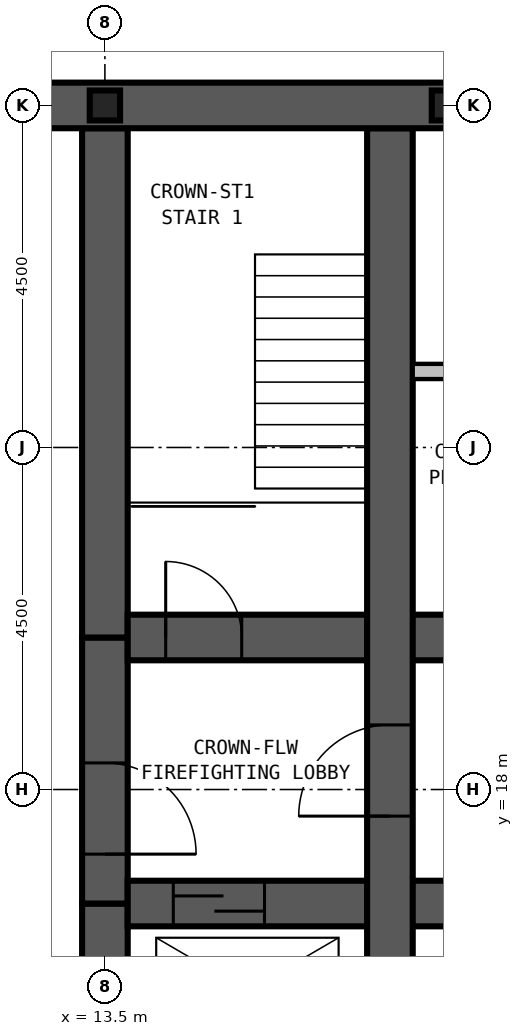
"""IFC4 building model, lengths in metres.
Left out: names, types, materials, properties, quantities, classifications, styles, units other than length and angle.
Written with IfcOpenShell. Run it as: python <this file> out.ifc"""

import sys

from ifc_helpers import new_model, si_unit, direction, frame, frame_2d, origin, origin_2d, place, context, subcontext, project, spatial, polyline, rectangle, i_section, outline, extrude, clip, halfspace, element, fill, save


model = new_model("IFC4")
c1 = context("Model", 3, precision=1e-05, world=origin(), true_north=direction((0.0, 1.0)))
c2 = subcontext(c1, "Body", "Model", "MODEL_VIEW")
j1 = project(units=[si_unit("LENGTHUNIT", "METRE"), si_unit("PLANEANGLEUNIT", "RADIAN")], contexts=[c1])
p1 = place(None, origin())
s1 = spatial("IfcSite", under=j1, at=p1, CompositionType="ELEMENT")
p2 = place(p1, origin())
s2 = spatial("IfcBuilding", under=s1, at=p2, CompositionType="ELEMENT")
p3 = place(p2, frame((0.0, 0.0, 289.7)))
s3 = spatial("IfcBuildingStorey", under=s2, at=p3, CompositionType="ELEMENT", Elevation=289.7)
p4 = place(p3, frame((36.3, 27.0, 0.0), z_axis=(0.0, 0.0, 1.0), x_axis=(-1.0, 0.0, 0.0)))
e1 = element("IfcWall", 1, at=p4, inside=s3, PredefinedType="SHEAR", context=c2, shape_type="SweptSolid", body=[
    extrude(rectangle(XDim=23.6, YDim=0.6, at=frame_2d((11.8, 0.0))), origin(), (0.0, 0.0, 1.0), 4.0),
])
p5 = place(p4, frame((17.05, 0.0, 0.0)))
e2 = element("IfcOpeningElement", 2, at=p5, cuts=e1, PredefinedType="OPENING", context=c2, shape_type="SweptSolid", body=[
    extrude(rectangle(XDim=1.0, YDim=2.1, at=frame_2d((0.5, 1.05))), frame((0.0, 0.31, 0.0), z_axis=(0.0, -1.0, 0.0), x_axis=(1.0, 0.0, 0.0)), (0.0, 0.0, 1.0), 0.62),
])
p6 = place(p4, frame((12.05, 0.0, 0.0)))
e3 = element("IfcOpeningElement", 3, at=p6, cuts=e1, PredefinedType="OPENING", context=c2, shape_type="SweptSolid", body=[
    extrude(rectangle(XDim=1.0, YDim=2.1, at=frame_2d((0.5, 1.05))), frame((0.0, 0.31, 0.0), z_axis=(0.0, -1.0, 0.0), x_axis=(1.0, 0.0, 0.0)), (0.0, 0.0, 1.0), 0.62),
])
p7 = place(p4, frame((7.05, 0.0, 0.0)))
e4 = element("IfcOpeningElement", 4, at=p7, cuts=e1, PredefinedType="OPENING", context=c2, shape_type="SweptSolid", body=[
    extrude(rectangle(XDim=1.0, YDim=2.1, at=frame_2d((0.5, 1.05))), frame((0.0, 0.31, 0.0), z_axis=(0.0, -1.0, 0.0), x_axis=(1.0, 0.0, 0.0)), (0.0, 0.0, 1.0), 0.62),
])
p8 = place(p3, frame((17.25, 13.8, 0.0), z_axis=(0.0, 0.0, 1.0), x_axis=(0.0, 1.0, 0.0)))
e5 = element("IfcWall", 5, at=p8, inside=s3, PredefinedType="SHEAR", context=c2, shape_type="SweptSolid", body=[
    extrude(rectangle(XDim=12.9, YDim=0.6, at=frame_2d((6.45, 0.0))), origin(), (0.0, 0.0, 1.0), 4.0),
])
p9 = place(p8, frame((3.85, 0.0, 0.0)))
e6 = element("IfcOpeningElement", 6, at=p9, cuts=e5, PredefinedType="OPENING", context=c2, shape_type="SweptSolid", body=[
    extrude(rectangle(XDim=1.2, YDim=2.1, at=frame_2d((0.6, 1.05))), frame((0.0, 0.31, 0.0), z_axis=(0.0, -1.0, 0.0), x_axis=(1.0, 0.0, 0.0)), (0.0, 0.0, 1.0), 0.62),
])
p10 = place(p3, frame((13.8, 16.5, 0.0), z_axis=(0.0, 0.0, 1.0), x_axis=(1.0, 0.0, 0.0)))
e7 = element("IfcWall", 7, at=p10, inside=s3, PredefinedType="SHEAR", context=c2, shape_type="SweptSolid", body=[
    extrude(rectangle(XDim=21.9, YDim=0.6, at=frame_2d((10.95, 0.0))), origin(), (0.0, 0.0, 1.0), 4.0),
])
p11 = place(p10, frame((5.75, 0.0, 0.0), z_axis=(0.0, 0.0, 1.0), x_axis=(-1.0, 0.0, 0.0)))
e8 = element("IfcOpeningElement", 8, at=p11, cuts=e7, PredefinedType="OPENING", context=c2, shape_type="SweptSolid", body=[
    extrude(rectangle(XDim=1.0, YDim=2.1, at=frame_2d((0.5, 1.05))), frame((0.0, 0.31, 0.0), z_axis=(0.0, -1.0, 0.0), x_axis=(1.0, 0.0, 0.0)), (0.0, 0.0, 1.0), 0.62),
])
p12 = place(p10, frame((10.2, 0.0, 0.0), z_axis=(0.0, 0.0, 1.0), x_axis=(-1.0, 0.0, 0.0)))
e9 = element("IfcOpeningElement", 9, at=p12, cuts=e7, PredefinedType="OPENING", context=c2, shape_type="SweptSolid", body=[
    extrude(rectangle(XDim=1.0, YDim=2.1, at=frame_2d((0.5, 1.05))), frame((0.0, 0.31, 0.0), z_axis=(0.0, -1.0, 0.0), x_axis=(1.0, 0.0, 0.0)), (0.0, 0.0, 1.0), 0.62),
])
p13 = place(p10, frame((12.7, 0.0, 0.0), z_axis=(0.0, 0.0, 1.0), x_axis=(-1.0, 0.0, 0.0)))
e10 = element("IfcOpeningElement", 10, at=p13, cuts=e7, PredefinedType="OPENING", context=c2, shape_type="SweptSolid", body=[
    extrude(rectangle(XDim=1.0, YDim=2.1, at=frame_2d((0.5, 1.05))), frame((0.0, 0.31, 0.0), z_axis=(0.0, -1.0, 0.0), x_axis=(1.0, 0.0, 0.0)), (0.0, 0.0, 1.0), 0.62),
])
p14 = place(p10, frame((17.15, 0.0, 0.0), z_axis=(0.0, 0.0, 1.0), x_axis=(-1.0, 0.0, 0.0)))
e11 = element("IfcOpeningElement", 11, at=p14, cuts=e7, PredefinedType="OPENING", context=c2, shape_type="SweptSolid", body=[
    extrude(rectangle(XDim=1.0, YDim=2.1, at=frame_2d((0.5, 1.05))), frame((0.0, 0.31, 0.0), z_axis=(0.0, -1.0, 0.0), x_axis=(1.0, 0.0, 0.0)), (0.0, 0.0, 1.0), 0.62),
])
p15 = place(p10, frame((0.6, 0.0, 0.0)))
e12 = element("IfcOpeningElement", 12, at=p15, cuts=e7, PredefinedType="OPENING", context=c2, shape_type="SweptSolid", body=[
    extrude(rectangle(XDim=1.2, YDim=2.1, at=frame_2d((0.6, 1.05))), frame((0.0, 0.31, 0.0), z_axis=(0.0, -1.0, 0.0), x_axis=(1.0, 0.0, 0.0)), (0.0, 0.0, 1.0), 0.62),
])
p16 = place(p10, frame((19.6, 0.0, 0.0)))
e13 = element("IfcOpeningElement", 13, at=p16, cuts=e7, PredefinedType="OPENING", context=c2, shape_type="SweptSolid", body=[
    extrude(rectangle(XDim=1.2, YDim=2.1, at=frame_2d((0.6, 1.05))), frame((0.0, 0.31, 0.0), z_axis=(0.0, -1.0, 0.0), x_axis=(1.0, 0.0, 0.0)), (0.0, 0.0, 1.0), 0.62),
])
p17 = place(p3, frame((13.8, 20.0, 0.0), z_axis=(0.0, 0.0, 1.0), x_axis=(1.0, 0.0, 0.0)))
e14 = element("IfcWall", 14, at=p17, inside=s3, PredefinedType="SHEAR", context=c2, shape_type="SweptSolid", body=[
    extrude(rectangle(XDim=21.9, YDim=0.6, at=frame_2d((10.95, 0.0))), origin(), (0.0, 0.0, 1.0), 4.0),
])
p18 = place(p17, frame((0.5, 0.0, 0.0)))
e15 = element("IfcOpeningElement", 15, at=p18, cuts=e14, PredefinedType="OPENING", context=c2, shape_type="SweptSolid", body=[
    extrude(rectangle(XDim=1.0, YDim=2.1, at=frame_2d((0.5, 1.05))), frame((0.0, 0.31, 0.0), z_axis=(0.0, -1.0, 0.0), x_axis=(1.0, 0.0, 0.0)), (0.0, 0.0, 1.0), 0.62),
])
p19 = place(p17, frame((20.5, 0.0, 0.0)))
e16 = element("IfcOpeningElement", 16, at=p19, cuts=e14, PredefinedType="OPENING", context=c2, shape_type="SweptSolid", body=[
    extrude(rectangle(XDim=1.0, YDim=2.1, at=frame_2d((0.5, 1.05))), frame((0.0, 0.31, 0.0), z_axis=(0.0, -1.0, 0.0), x_axis=(1.0, 0.0, 0.0)), (0.0, 0.0, 1.0), 0.62),
])
p20 = place(p17, frame((4.75, 0.0, 0.0)))
e17 = element("IfcOpeningElement", 17, at=p20, cuts=e14, PredefinedType="OPENING", context=c2, shape_type="SweptSolid", body=[
    extrude(rectangle(XDim=1.0, YDim=2.1, at=frame_2d((0.5, 1.05))), frame((0.0, 0.31, 0.0), z_axis=(0.0, -1.0, 0.0), x_axis=(1.0, 0.0, 0.0)), (0.0, 0.0, 1.0), 0.62),
])
p21 = place(p17, frame((6.7, 0.0, 0.0)))
e18 = element("IfcOpeningElement", 18, at=p21, cuts=e14, PredefinedType="OPENING", context=c2, shape_type="SweptSolid", body=[
    extrude(rectangle(XDim=1.0, YDim=2.1, at=frame_2d((0.5, 1.05))), frame((0.0, 0.31, 0.0), z_axis=(0.0, -1.0, 0.0), x_axis=(1.0, 0.0, 0.0)), (0.0, 0.0, 1.0), 0.62),
])
p22 = place(p3, frame((13.5, 26.7, 0.0), z_axis=(0.0, 0.0, 1.0), x_axis=(0.0, -1.0, 0.0)))
e19 = element("IfcWall", 19, at=p22, inside=s3, PredefinedType="SHEAR", context=c2, shape_type="SweptSolid", body=[
    extrude(rectangle(XDim=6.7, YDim=0.6, at=frame_2d((3.35, 0.0))), origin(), (0.0, 0.0, 1.0), 4.0),
])
p23 = place(p3, frame((13.5, 20.0, 0.0), z_axis=(0.0, 0.0, 1.0), x_axis=(0.0, -1.0, 0.0)))
e20 = element("IfcWall", 20, at=p23, inside=s3, PredefinedType="SHEAR", context=c2, shape_type="SweptSolid", body=[
    extrude(rectangle(XDim=3.5, YDim=0.6, at=frame_2d((1.75, 0.0))), origin(), (0.0, 0.0, 1.0), 4.0),
])
p24 = place(p23, frame((1.65, 0.0, 0.0)))
e21 = element("IfcOpeningElement", 21, at=p24, cuts=e20, PredefinedType="OPENING", context=c2, shape_type="SweptSolid", body=[
    extrude(rectangle(XDim=1.2, YDim=2.1, at=frame_2d((0.6, 1.05))), frame((0.0, 0.31, 0.0), z_axis=(0.0, -1.0, 0.0), x_axis=(1.0, 0.0, 0.0)), (0.0, 0.0, 1.0), 0.62),
])
p25 = place(p3, frame((13.5, 16.5, 0.0), z_axis=(0.0, 0.0, 1.0), x_axis=(0.0, -1.0, 0.0)))
e22 = element("IfcWall", 22, at=p25, inside=s3, PredefinedType="SHEAR", context=c2, shape_type="SweptSolid", body=[
    extrude(rectangle(XDim=2.7, YDim=0.6, at=frame_2d((1.35, 0.0))), origin(), (0.0, 0.0, 1.0), 4.0),
])
p26 = place(p3, frame((13.5, 27.0, 4.0), z_axis=(0.0, 0.0, 1.0), x_axis=(1.0, 0.0, 0.0)))
e23 = element("IfcColumn", 23, at=p26, inside=s3, PredefinedType="COLUMN", context=c2, shape_type="SweptSolid", body=[
    extrude(i_section(OverallWidth=0.399, OverallDepth=0.394, WebThickness=0.023, FlangeThickness=0.037, FilletRadius=0.015, at=origin_2d()), origin(), (0.0, 0.0, 1.0), 4.29),
])
p27 = place(p3, frame((18.0, 27.0, 4.0), z_axis=(0.0, 0.0, 1.0), x_axis=(1.0, 0.0, 0.0)))
e24 = element("IfcColumn", 24, at=p27, inside=s3, PredefinedType="COLUMN", context=c2, shape_type="SweptSolid", body=[
    extrude(i_section(OverallWidth=0.399, OverallDepth=0.394, WebThickness=0.023, FlangeThickness=0.037, FilletRadius=0.015, at=origin_2d()), origin(), (0.0, 0.0, 1.0), 5.73),
])
p28 = place(p3, frame((13.114, 41.099, -0.3), z_axis=(0.0, 0.0, 1.0), x_axis=(-0.110429082637, -0.993884006164, 0.0)))
e25 = element("IfcWall", 25, at=p28, inside=s3, PredefinedType="STANDARD", context=c2, shape_type="Clipping", body=[
    clip(extrude(outline(polyline([(0.0, 0.0), (32.899, 0.0), (32.899, 3.117), (0.0, 13.435), (0.0, 0.0)])), frame((0.0, 0.15, 0.0), z_axis=(0.0, -1.0, 0.0), x_axis=(1.0, 0.0, 0.0)), (0.0, 0.0, 1.0), 0.3), halfspace(frame((0.0, 0.0, 13.435), z_axis=(0.288617563537, -0.264228140999, 0.920262675285), x_axis=(0.954173815871, 0.0, -0.299252951709)), False)),
])
p29 = place(p28, frame((1.617, 0.0, 0.8)))
e26 = element("IfcOpeningElement", 26, at=p29, cuts=e25, PredefinedType="OPENING", context=c2, shape_type="SweptSolid", body=[
    extrude(rectangle(XDim=2.4, YDim=1.8, at=frame_2d((1.2, 0.9))), frame((0.0, 0.16, 0.0), z_axis=(0.0, -1.0, 0.0), x_axis=(1.0, 0.0, 0.0)), (0.0, 0.0, 1.0), 0.32),
])
p30 = place(p28, frame((6.145, 0.0, 0.8)))
e27 = element("IfcOpeningElement", 27, at=p30, cuts=e25, PredefinedType="OPENING", context=c2, shape_type="SweptSolid", body=[
    extrude(rectangle(XDim=2.4, YDim=1.8, at=frame_2d((1.2, 0.9))), frame((0.0, 0.16, 0.0), z_axis=(0.0, -1.0, 0.0), x_axis=(1.0, 0.0, 0.0)), (0.0, 0.0, 1.0), 0.32),
])
p31 = place(p28, frame((10.672, 0.0, 0.8)))
e28 = element("IfcOpeningElement", 28, at=p31, cuts=e25, PredefinedType="OPENING", context=c2, shape_type="SweptSolid", body=[
    extrude(rectangle(XDim=2.4, YDim=1.8, at=frame_2d((1.2, 0.9))), frame((0.0, 0.16, 0.0), z_axis=(0.0, -1.0, 0.0), x_axis=(1.0, 0.0, 0.0)), (0.0, 0.0, 1.0), 0.32),
])
p32 = place(p28, frame((15.2, 0.0, 0.8)))
e29 = element("IfcOpeningElement", 29, at=p32, cuts=e25, PredefinedType="OPENING", context=c2, shape_type="SweptSolid", body=[
    extrude(rectangle(XDim=2.4, YDim=1.8, at=frame_2d((1.2, 0.9))), frame((0.0, 0.16, 0.0), z_axis=(0.0, -1.0, 0.0), x_axis=(1.0, 0.0, 0.0)), (0.0, 0.0, 1.0), 0.32),
])
p33 = place(p28, frame((19.728, 0.0, 0.8)))
e30 = element("IfcOpeningElement", 30, at=p33, cuts=e25, PredefinedType="OPENING", context=c2, shape_type="SweptSolid", body=[
    extrude(rectangle(XDim=2.4, YDim=1.8, at=frame_2d((1.2, 0.9))), frame((0.0, 0.16, 0.0), z_axis=(0.0, -1.0, 0.0), x_axis=(1.0, 0.0, 0.0)), (0.0, 0.0, 1.0), 0.32),
])
p34 = place(p28, frame((24.255, 0.0, 0.8)))
e31 = element("IfcOpeningElement", 31, at=p34, cuts=e25, PredefinedType="OPENING", context=c2, shape_type="SweptSolid", body=[
    extrude(rectangle(XDim=2.4, YDim=1.8, at=frame_2d((1.2, 0.9))), frame((0.0, 0.16, 0.0), z_axis=(0.0, -1.0, 0.0), x_axis=(1.0, 0.0, 0.0)), (0.0, 0.0, 1.0), 0.32),
])
p35 = place(p28, frame((28.783, 0.0, 0.8)))
e32 = element("IfcOpeningElement", 32, at=p35, cuts=e25, PredefinedType="OPENING", context=c2, shape_type="SweptSolid", body=[
    extrude(rectangle(XDim=2.4, YDim=1.8, at=frame_2d((1.2, 0.9))), frame((0.0, 0.16, 0.0), z_axis=(0.0, -1.0, 0.0), x_axis=(1.0, 0.0, 0.0)), (0.0, 0.0, 1.0), 0.32),
])
p36 = place(p3, frame((17.55, 23.5, 0.0), z_axis=(0.0, 0.0, 1.0), x_axis=(1.0, 0.0, 0.0)))
e33 = element("IfcWall", 33, at=p36, inside=s3, PredefinedType="PARTITIONING", context=c2, shape_type="SweptSolid", body=[
    extrude(rectangle(XDim=14.4, YDim=0.2, at=frame_2d((7.2, 0.0))), origin(), (0.0, 0.0, 1.0), 4.0),
])
p37 = place(p24, origin())
e34 = element("IfcDoor", 34, at=p37, inside=s3, OperationType="SINGLE_SWING_RIGHT", PredefinedType="DOOR", context=c2, shape_type="SweptSolid", body=[
    extrude(rectangle(XDim=1.2, YDim=2.1, at=frame_2d((0.6, 1.05))), frame((0.0, 0.3, 0.0), z_axis=(0.0, -1.0, 0.0), x_axis=(1.0, 0.0, 0.0)), (0.0, 0.0, 1.0), 0.6),
])
fill(e21, e34)
p38 = place(p9, origin())
e35 = element("IfcDoor", 35, at=p38, inside=s3, OperationType="SINGLE_SWING_LEFT", PredefinedType="DOOR", context=c2, shape_type="SweptSolid", body=[
    extrude(rectangle(XDim=1.2, YDim=2.1, at=frame_2d((0.6, 1.05))), frame((0.0, 0.3, 0.0), z_axis=(0.0, -1.0, 0.0), x_axis=(1.0, 0.0, 0.0)), (0.0, 0.0, 1.0), 0.6),
])
fill(e6, e35)
p39 = place(p18, origin())
e36 = element("IfcDoor", 36, at=p39, inside=s3, OperationType="SINGLE_SWING_LEFT", PredefinedType="DOOR", context=c2, shape_type="SweptSolid", body=[
    extrude(rectangle(XDim=1.0, YDim=2.1, at=frame_2d((0.5, 1.05))), frame((0.0, 0.3, 0.0), z_axis=(0.0, -1.0, 0.0), x_axis=(1.0, 0.0, 0.0)), (0.0, 0.0, 1.0), 0.6),
])
fill(e15, e36)
p40 = place(p15, origin())
e37 = element("IfcDoor", 37, at=p40, inside=s3, OperationType="SLIDING_TO_LEFT", PredefinedType="DOOR", context=c2, shape_type="SweptSolid", body=[
    extrude(rectangle(XDim=1.2, YDim=2.1, at=frame_2d((0.6, 1.05))), frame((0.0, 0.3, 0.0), z_axis=(0.0, -1.0, 0.0), x_axis=(1.0, 0.0, 0.0)), (0.0, 0.0, 1.0), 0.6),
])
fill(e12, e37)
save(model, sys.argv[1])
